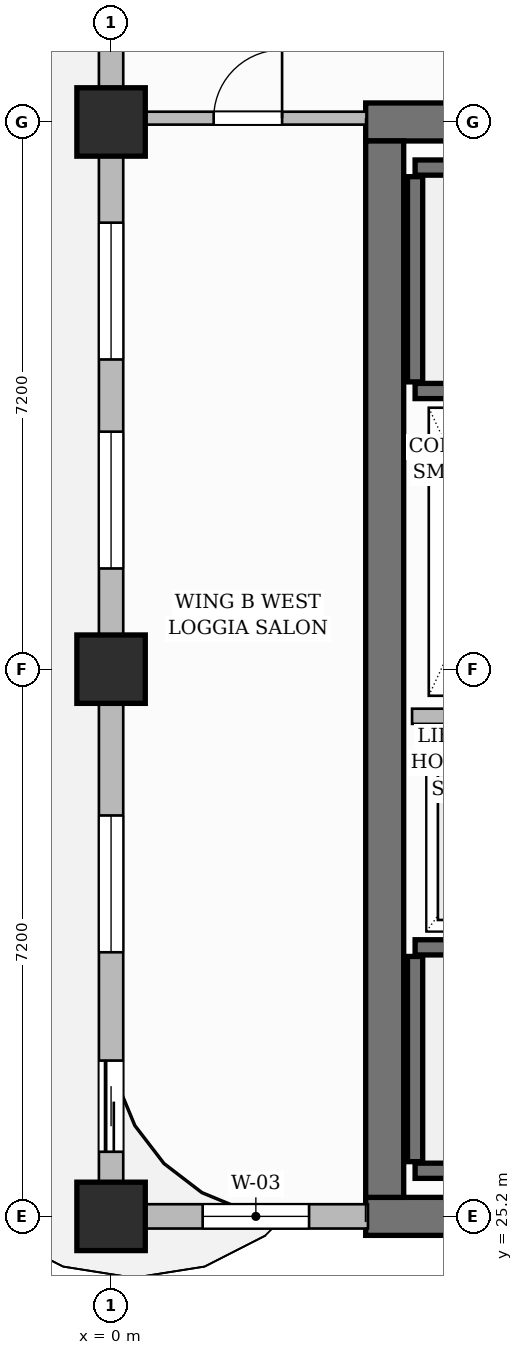
"""IFC4 building model, lengths in metres.
Left out: names, types, materials, properties, quantities, classifications, styles, units other than length and angle.
Written with IfcOpenShell. Run it as: python <this file> out.ifc"""

import sys

from ifc_helpers import new_model, si_unit, direction, frame, frame_2d, origin, origin_2d, place, context, subcontext, project, spatial, rectangle, extrude, source, transform, mapped, element, fill, save


model = new_model("IFC4")
c1 = context("Model", 3, precision=1e-05, world=origin(), true_north=direction((0.0, 1.0)))
c2 = subcontext(c1, "Body", "Model", "MODEL_VIEW")
j1 = project(units=[si_unit("LENGTHUNIT", "METRE"), si_unit("PLANEANGLEUNIT", "RADIAN")], contexts=[c1])
p1 = place(None, origin())
s1 = spatial("IfcSite", under=j1, at=p1, CompositionType="ELEMENT")
p2 = place(p1, origin())
s2 = spatial("IfcBuilding", under=s1, at=p2, CompositionType="ELEMENT")
p3 = place(p2, frame((0.0, 0.0, 201.9)))
s3 = spatial("IfcBuildingStorey", under=s2, at=p3, CompositionType="ELEMENT", Elevation=201.9)
for number, where, z_axis, x_axis in (
    (1, (3.35, 25.2, 0.0), (0.0, 0.0, 1.0), (1.0, 0.0, 0.0)),
    (2, (3.35, 39.6, 0.0), (0.0, 0.0, 1.0), (1.0, 0.0, 0.0)),
):
    element("IfcWall", number, at=place(p3, frame(where, z_axis=z_axis, x_axis=x_axis)), inside=s3, PredefinedType="SHEAR", context=c2, shape_type="SweptSolid", body=[
        extrude(rectangle(XDim=8.3, YDim=0.5, at=frame_2d((4.15, 0.0))), origin(), (0.0, 0.0, 1.0), 3.85),
    ])
p4 = place(p3, frame((3.6, 25.45, 0.0), z_axis=(0.0, 0.0, 1.0), x_axis=(0.0, 1.0, 0.0)))
e3 = element("IfcWall", 3, at=p4, inside=s3, PredefinedType="SHEAR", context=c2, shape_type="SweptSolid", body=[
    extrude(rectangle(XDim=13.9, YDim=0.5, at=frame_2d((6.95, 0.0))), origin(), (0.0, 0.0, 1.0), 3.85),
])
m1 = source(origin(), c2, "Body", "SweptSolid", [
    extrude(rectangle(XDim=0.9, YDim=0.9, at=origin_2d()), origin(), (0.0, 0.0, 1.0), 3.85),
])
for number, where, z_axis, x_axis in (
    (4, (0.0, 25.2, 0.0), (0.0, 0.0, 1.0), (1.0, 0.0, 0.0)),
    (5, (0.0, 32.4, 0.0), (0.0, 0.0, 1.0), (1.0, 0.0, 0.0)),
    (6, (0.0, 39.6, 0.0), (0.0, 0.0, 1.0), (1.0, 0.0, 0.0)),
):
    element("IfcColumn", number, at=place(p3, frame(where, z_axis=z_axis, x_axis=x_axis)), inside=s3, PredefinedType="COLUMN", context=c2, shape_type="MappedRepresentation", body=[
        mapped(m1, transform((0.0, 0.0, 0.0), scale=1.0)),
    ])
p5 = place(p3, frame((4.0, 25.8, 0.0), z_axis=(0.0, 0.0, 1.0), x_axis=(1.0, 0.0, 0.0)))
e7 = element("IfcWall", 7, at=p5, inside=s3, PredefinedType="SHEAR", context=c2, shape_type="SweptSolid", body=[
    extrude(rectangle(XDim=7.1, YDim=0.2, at=frame_2d((3.55, 0.0))), origin(), (0.0, 0.0, 1.0), 3.85),
])
p6 = place(p3, frame((4.0, 25.92, 0.0), z_axis=(0.0, 0.0, 1.0), x_axis=(0.0, 1.0, 0.0)))
e8 = element("IfcWall", 8, at=p6, inside=s3, PredefinedType="SHEAR", context=c2, shape_type="SweptSolid", body=[
    extrude(rectangle(XDim=2.7, YDim=0.2, at=frame_2d((1.35, 0.0))), origin(), (0.0, 0.0, 1.0), 3.85),
])
p7 = place(p3, frame((4.0, 28.74, 0.0), z_axis=(0.0, 0.0, 1.0), x_axis=(1.0, 0.0, 0.0)))
e9 = element("IfcWall", 9, at=p7, inside=s3, PredefinedType="SHEAR", context=c2, shape_type="SweptSolid", body=[
    extrude(rectangle(XDim=7.1, YDim=0.2, at=frame_2d((3.55, 0.0))), origin(), (0.0, 0.0, 1.0), 3.85),
])
p8 = place(p7, frame((5.815, 0.0, 0.0)))
e10 = element("IfcOpeningElement", 10, at=p8, cuts=e9, PredefinedType="OPENING", context=c2, shape_type="SweptSolid", body=[
    extrude(rectangle(XDim=1.05, YDim=2.2, at=frame_2d((0.525, 1.1))), frame((0.0, 0.11, 0.0), z_axis=(0.0, -1.0, 0.0), x_axis=(1.0, 0.0, 0.0)), (0.0, 0.0, 1.0), 0.22),
])
p9 = place(p3, frame((4.0, 39.0, 0.0), z_axis=(0.0, 0.0, 1.0), x_axis=(1.0, 0.0, 0.0)))
e11 = element("IfcWall", 11, at=p9, inside=s3, PredefinedType="SHEAR", context=c2, shape_type="SweptSolid", body=[
    extrude(rectangle(XDim=7.1, YDim=0.2, at=frame_2d((3.55, 0.0))), origin(), (0.0, 0.0, 1.0), 3.85),
])
p10 = place(p3, frame((4.0, 36.18, 0.0), z_axis=(0.0, 0.0, 1.0), x_axis=(0.0, 1.0, 0.0)))
e12 = element("IfcWall", 12, at=p10, inside=s3, PredefinedType="SHEAR", context=c2, shape_type="SweptSolid", body=[
    extrude(rectangle(XDim=2.7, YDim=0.2, at=frame_2d((1.35, 0.0))), origin(), (0.0, 0.0, 1.0), 3.85),
])
p11 = place(p3, frame((4.0, 36.06, 0.0), z_axis=(0.0, 0.0, 1.0), x_axis=(1.0, 0.0, 0.0)))
e13 = element("IfcWall", 13, at=p11, inside=s3, PredefinedType="SHEAR", context=c2, shape_type="SweptSolid", body=[
    extrude(rectangle(XDim=7.1, YDim=0.2, at=frame_2d((3.55, 0.0))), origin(), (0.0, 0.0, 1.0), 3.85),
])
p12 = place(p11, frame((5.815, 0.0, 0.0)))
e14 = element("IfcOpeningElement", 14, at=p12, cuts=e13, PredefinedType="OPENING", context=c2, shape_type="SweptSolid", body=[
    extrude(rectangle(XDim=1.05, YDim=2.2, at=frame_2d((0.525, 1.1))), frame((0.0, 0.11, 0.0), z_axis=(0.0, -1.0, 0.0), x_axis=(1.0, 0.0, 0.0)), (0.0, 0.0, 1.0), 0.22),
])
p13 = place(p3, frame((3.96, 31.78, 0.0), z_axis=(0.0, 0.0, 1.0), x_axis=(1.0, 0.0, 0.0)))
e15 = element("IfcWall", 15, at=p13, inside=s3, PredefinedType="PARTITIONING", context=c2, shape_type="SweptSolid", body=[
    extrude(rectangle(XDim=2.13, YDim=0.2, at=frame_2d((1.065, 0.0))), origin(), (0.0, 0.0, 1.0), 3.6),
])
p14 = place(p3, frame((0.24, 39.65, 0.0), z_axis=(0.0, 0.0, 1.0), x_axis=(1.0, 0.0, 0.0)))
e16 = element("IfcWall", 16, at=p14, inside=s3, PredefinedType="PARTITIONING", context=c2, shape_type="SweptSolid", body=[
    extrude(rectangle(XDim=3.12, YDim=0.17, at=frame_2d((1.56, 0.0))), origin(), (0.0, 0.0, 1.0), 3.6),
])
p15 = place(p14, frame((1.11, 0.0, 0.0)))
e17 = element("IfcOpeningElement", 17, at=p15, cuts=e16, PredefinedType="OPENING", context=c2, shape_type="SweptSolid", body=[
    extrude(rectangle(XDim=0.9, YDim=2.15, at=frame_2d((0.45, 1.075))), frame((0.0, 0.095, 0.0), z_axis=(0.0, -1.0, 0.0), x_axis=(1.0, 0.0, 0.0)), (0.0, 0.0, 1.0), 0.19),
])
p16 = place(p3, frame((0.0, 25.2, 0.0), z_axis=(0.0, 0.0, 1.0), x_axis=(1.0, 0.0, 0.0)))
e18 = element("IfcWall", 18, at=p16, inside=s3, PredefinedType="SOLIDWALL", context=c2, shape_type="SweptSolid", body=[
    extrude(rectangle(XDim=3.38, YDim=0.32, at=frame_2d((1.69, 0.0))), origin(), (0.0, 0.0, 1.0), 3.6),
])
p17 = place(p16, frame((1.205, 0.0, 0.8)))
e19 = element("IfcOpeningElement", 19, at=p17, cuts=e18, PredefinedType="OPENING", context=c2, shape_type="SweptSolid", body=[
    extrude(rectangle(XDim=1.4, YDim=1.85, at=frame_2d((0.7, 0.925))), frame((0.0, 0.17, 0.0), z_axis=(0.0, -1.0, 0.0), x_axis=(1.0, 0.0, 0.0)), (0.0, 0.0, 1.0), 0.34),
])
p18 = place(p3, frame((0.0, 25.25, 0.0), z_axis=(0.0, 0.0, 1.0), x_axis=(0.0, 1.0, 0.0)))
e20 = element("IfcWall", 20, at=p18, inside=s3, PredefinedType="SOLIDWALL", context=c2, shape_type="SweptSolid", body=[
    extrude(rectangle(XDim=21.5, YDim=0.32, at=frame_2d((10.75, 0.0))), origin(), (0.0, 0.0, 1.0), 3.085),
])
p19 = place(p18, frame((18.45, 0.0, 0.0)))
e21 = element("IfcOpeningElement", 21, at=p19, cuts=e20, PredefinedType="OPENING", context=c2, shape_type="SweptSolid", body=[
    extrude(rectangle(XDim=1.2, YDim=2.2, at=frame_2d((0.6, 1.1))), frame((0.0, 0.17, 0.0), z_axis=(0.0, -1.0, 0.0), x_axis=(1.0, 0.0, 0.0)), (0.0, 0.0, 1.0), 0.34),
])
p20 = place(p18, frame((0.8, 0.0, 0.0)))
e22 = element("IfcOpeningElement", 22, at=p20, cuts=e20, PredefinedType="OPENING", context=c2, shape_type="SweptSolid", body=[
    extrude(rectangle(XDim=1.2, YDim=2.2, at=frame_2d((0.6, 1.1))), frame((0.0, 0.17, 0.0), z_axis=(0.0, -1.0, 0.0), x_axis=(1.0, 0.0, 0.0)), (0.0, 0.0, 1.0), 0.34),
])
p21 = place(p18, frame((3.425, 0.0, 0.8)))
e23 = element("IfcOpeningElement", 23, at=p21, cuts=e20, PredefinedType="OPENING", context=c2, shape_type="SweptSolid", body=[
    extrude(rectangle(XDim=1.8, YDim=1.85, at=frame_2d((0.9, 0.925))), frame((0.0, 0.17, 0.0), z_axis=(0.0, -1.0, 0.0), x_axis=(1.0, 0.0, 0.0)), (0.0, 0.0, 1.0), 0.34),
])
p22 = place(p18, frame((8.475, 0.0, 0.8)))
e24 = element("IfcOpeningElement", 24, at=p22, cuts=e20, PredefinedType="OPENING", context=c2, shape_type="SweptSolid", body=[
    extrude(rectangle(XDim=1.8, YDim=1.85, at=frame_2d((0.9, 0.925))), frame((0.0, 0.17, 0.0), z_axis=(0.0, -1.0, 0.0), x_axis=(1.0, 0.0, 0.0)), (0.0, 0.0, 1.0), 0.34),
])
p23 = place(p18, frame((11.225, 0.0, 0.8)))
e25 = element("IfcOpeningElement", 25, at=p23, cuts=e20, PredefinedType="OPENING", context=c2, shape_type="SweptSolid", body=[
    extrude(rectangle(XDim=1.8, YDim=1.85, at=frame_2d((0.9, 0.925))), frame((0.0, 0.17, 0.0), z_axis=(0.0, -1.0, 0.0), x_axis=(1.0, 0.0, 0.0)), (0.0, 0.0, 1.0), 0.34),
])
p24 = place(p18, frame((15.75, 0.0, 0.8)))
e26 = element("IfcOpeningElement", 26, at=p24, cuts=e20, PredefinedType="OPENING", context=c2, shape_type="SweptSolid", body=[
    extrude(rectangle(XDim=1.8, YDim=1.85, at=frame_2d((0.9, 0.925))), frame((0.0, 0.17, 0.0), z_axis=(0.0, -1.0, 0.0), x_axis=(1.0, 0.0, 0.0)), (0.0, 0.0, 1.0), 0.34),
])
m2 = source(origin(), c2, "Body", "SweptSolid", [
    extrude(rectangle(XDim=0.9, YDim=2.15, at=frame_2d((0.45, 1.075))), frame((0.0, 0.025, 0.0), z_axis=(0.0, -1.0, 0.0), x_axis=(1.0, 0.0, 0.0)), (0.0, 0.0, 1.0), 0.05),
])
p25 = place(p15, origin())
e27 = element("IfcDoor", 27, at=p25, inside=s3, OperationType="SINGLE_SWING_RIGHT", PredefinedType="DOOR", context=c2, shape_type="MappedRepresentation", body=[
    mapped(m2, transform((0.0, 0.0, 0.0), scale=1.0)),
])
fill(e17, e27)
m3 = source(origin(), c2, "Body", "SweptSolid", [
    extrude(rectangle(XDim=1.2, YDim=2.2, at=frame_2d((0.6, 1.1))), frame((0.0, 0.025, 0.0), z_axis=(0.0, -1.0, 0.0), x_axis=(1.0, 0.0, 0.0)), (0.0, 0.0, 1.0), 0.05),
])
p26 = place(p20, origin())
e28 = element("IfcDoor", 28, at=p26, inside=s3, OperationType="SLIDING_TO_LEFT", PredefinedType="DOOR", context=c2, shape_type="MappedRepresentation", body=[
    mapped(m3, transform((0.0, 0.0, 0.0), scale=1.0)),
])
fill(e22, e28)
m4 = source(origin(), c2, "Body", "SweptSolid", [
    extrude(rectangle(XDim=1.4, YDim=1.85, at=frame_2d((0.7, 0.925))), frame((0.0, 0.03, 0.0), z_axis=(0.0, -1.0, 0.0), x_axis=(1.0, 0.0, 0.0)), (0.0, 0.0, 1.0), 0.06),
])
p27 = place(p17, origin())
e29 = element("IfcWindow", 29, at=p27, inside=s3, PartitioningType="SINGLE_PANEL", PredefinedType="WINDOW", context=c2, shape_type="MappedRepresentation", body=[
    mapped(m4, transform((0.0, 0.0, 0.0), scale=1.0)),
])
fill(e19, e29)
m5 = source(origin(), c2, "Body", "SweptSolid", [
    extrude(rectangle(XDim=1.8, YDim=1.85, at=frame_2d((0.9, 0.925))), frame((0.0, 0.03, 0.0), z_axis=(0.0, -1.0, 0.0), x_axis=(1.0, 0.0, 0.0)), (0.0, 0.0, 1.0), 0.06),
])
p28 = place(p21, origin())
e30 = element("IfcWindow", 30, at=p28, inside=s3, PartitioningType="DOUBLE_PANEL_VERTICAL", PredefinedType="WINDOW", context=c2, shape_type="MappedRepresentation", body=[
    mapped(m5, transform((0.0, 0.0, 0.0), scale=1.0)),
])
fill(e23, e30)
p29 = place(p22, origin())
e31 = element("IfcWindow", 31, at=p29, inside=s3, PartitioningType="DOUBLE_PANEL_VERTICAL", PredefinedType="WINDOW", context=c2, shape_type="MappedRepresentation", body=[
    mapped(m5, transform((0.0, 0.0, 0.0), scale=1.0)),
])
fill(e24, e31)
p30 = place(p23, origin())
e32 = element("IfcWindow", 32, at=p30, inside=s3, PartitioningType="DOUBLE_PANEL_VERTICAL", PredefinedType="WINDOW", context=c2, shape_type="MappedRepresentation", body=[
    mapped(m5, transform((0.0, 0.0, 0.0), scale=1.0)),
])
fill(e25, e32)
save(model, sys.argv[1])
